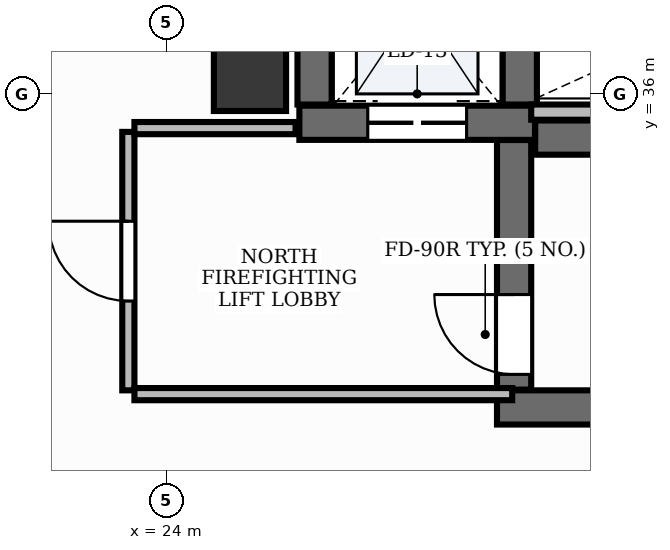
"""IFC4 building model, lengths in metres.
Left out: names, types, materials, properties, quantities, classifications, styles, units other than length and angle.
Written with IfcOpenShell. Run it as: python <this file> out.ifc"""

import sys

from ifc_helpers import new_model, si_unit, direction, frame, frame_2d, origin, origin_2d, place, context, subcontext, project, spatial, rectangle, extrude, element, fill, save


model = new_model("IFC4")
c1 = context("Model", 3, precision=1e-05, world=origin(), true_north=direction((0.0, 1.0)))
c2 = subcontext(c1, "Body", "Model", "MODEL_VIEW")
j1 = project(units=[si_unit("LENGTHUNIT", "METRE"), si_unit("PLANEANGLEUNIT", "RADIAN")], contexts=[c1])
p1 = place(None, origin())
s1 = spatial("IfcSite", under=j1, at=p1, CompositionType="ELEMENT")
p2 = place(p1, origin())
s2 = spatial("IfcBuilding", under=s1, at=p2, CompositionType="ELEMENT")
p3 = place(p2, frame((0.0, 0.0, 127.8)))
s3 = spatial("IfcBuildingStorey", under=s2, at=p3, CompositionType="ELEMENT", Elevation=127.8)
p4 = place(p3, frame((28.852, 35.425, 0.0), z_axis=(0.0, 0.0, 1.0), x_axis=(1.0, 0.0, 0.0)))
e1 = element("IfcWall", 1, at=p4, inside=s3, PredefinedType="SHEAR", context=c2, shape_type="SweptSolid", body=[
    extrude(rectangle(XDim=8.248, YDim=0.45, at=frame_2d((4.124, 0.0))), origin(), (0.0, 0.0, 1.0), 3.9),
])
p5 = place(p3, frame((28.35, 31.875, 0.0), z_axis=(0.0, 0.0, 1.0), x_axis=(1.0, 0.0, 0.0)))
e2 = element("IfcWall", 2, at=p5, inside=s3, PredefinedType="SHEAR", context=c2, shape_type="SweptSolid", body=[
    extrude(rectangle(XDim=8.75, YDim=0.45, at=frame_2d((4.375, 0.0))), origin(), (0.0, 0.0, 1.0), 3.9),
])
p6 = place(p3, frame((28.575, 32.11, 0.0), z_axis=(0.0, 0.0, 1.0), x_axis=(0.0, 1.0, 0.0)))
e3 = element("IfcWall", 3, at=p6, inside=s3, PredefinedType="SHEAR", context=c2, shape_type="SweptSolid", body=[
    extrude(rectangle(XDim=3.283, YDim=0.45, at=frame_2d((1.642, 0.0))), origin(), (0.0, 0.0, 1.0), 3.9),
])
p7 = place(p6, frame((0.2, 0.0, 0.0)))
e4 = element("IfcOpeningElement", 4, at=p7, cuts=e3, PredefinedType="OPENING", context=c2, shape_type="SweptSolid", body=[
    extrude(rectangle(XDim=1.05, YDim=2.15, at=frame_2d((0.525, 1.075))), frame((0.0, 0.24, 0.0), z_axis=(0.0, -1.0, 0.0), x_axis=(1.0, 0.0, 0.0)), (0.0, 0.0, 1.0), 0.48),
])
p8 = place(p3, frame((25.75, 35.62, 0.0), z_axis=(0.0, 0.0, 1.0), x_axis=(1.0, 0.0, 0.0)))
e5 = element("IfcWall", 5, at=p8, inside=s3, PredefinedType="SHEAR", context=c2, shape_type="SweptSolid", body=[
    extrude(rectangle(XDim=3.1, YDim=0.45, at=frame_2d((1.55, 0.0))), origin(), (0.0, 0.0, 1.0), 3.9),
])
p9 = place(p8, frame((0.9, 0.0, 0.0)))
e6 = element("IfcOpeningElement", 6, at=p9, cuts=e5, PredefinedType="OPENING", context=c2, shape_type="SweptSolid", body=[
    extrude(rectangle(XDim=1.3, YDim=2.2, at=frame_2d((0.65, 1.1))), frame((0.0, 0.24, 0.0), z_axis=(0.0, -1.0, 0.0), x_axis=(1.0, 0.0, 0.0)), (0.0, 0.0, 1.0), 0.48),
])
for number, where, z_axis, x_axis in (
    (7, (25.95, 35.86, 0.0), (0.0, 0.0, 1.0), (0.0, 1.0, 0.0)),
    (8, (28.65, 35.86, 0.0), (0.0, 0.0, 1.0), (0.0, 1.0, 0.0)),
):
    element("IfcWall", number, at=place(p3, frame(where, z_axis=z_axis, x_axis=x_axis)), inside=s3, PredefinedType="SHEAR", context=c2, shape_type="SweptSolid", body=[
        extrude(rectangle(XDim=2.7, YDim=0.45, at=frame_2d((1.35, 0.0))), origin(), (0.0, 0.0, 1.0), 3.9),
    ])
p10 = place(p3, frame((25.1, 36.25, -0.0), z_axis=(0.0, 0.0, 1.0), x_axis=(1.0, 0.0, 0.0)))
e9 = element("IfcColumn", 9, at=p10, inside=s3, PredefinedType="PILASTER", context=c2, shape_type="SweptSolid", body=[
    extrude(rectangle(XDim=0.95, YDim=0.95, at=origin_2d()), origin(), (0.0, 0.0, 1.0), 3.901),
])
p11 = place(p3, frame((28.8, 35.76, 0.0), z_axis=(0.0, 0.0, 1.0), x_axis=(1.0, 0.0, 0.0)))
e10 = element("IfcWall", 10, at=p11, inside=s3, PredefinedType="PARTITIONING", context=c2, shape_type="SweptSolid", body=[
    extrude(rectangle(XDim=4.57, YDim=0.2, at=frame_2d((2.285, 0.0))), origin(), (0.0, 0.0, 1.0), 2.91),
])
p12 = place(p3, frame((23.5, 32.1, 0.0), z_axis=(0.0, 0.0, 1.0), x_axis=(0.0, 1.0, 0.0)))
e11 = element("IfcWall", 11, at=p12, inside=s3, PredefinedType="PARTITIONING", context=c2, shape_type="SweptSolid", body=[
    extrude(rectangle(XDim=3.4, YDim=0.16, at=frame_2d((1.7, 0.0))), origin(), (0.0, 0.0, 1.0), 2.91),
])
p13 = place(p12, frame((1.175, 0.0, 0.0)))
e12 = element("IfcOpeningElement", 12, at=p13, cuts=e11, PredefinedType="OPENING", context=c2, shape_type="SweptSolid", body=[
    extrude(rectangle(XDim=1.05, YDim=2.15, at=frame_2d((0.525, 1.075))), frame((0.0, 0.095, 0.0), z_axis=(0.0, -1.0, 0.0), x_axis=(1.0, 0.0, 0.0)), (0.0, 0.0, 1.0), 0.19),
])
p14 = place(p3, frame((23.58, 32.05, 0.0), z_axis=(0.0, 0.0, 1.0), x_axis=(1.0, 0.0, 0.0)))
e13 = element("IfcWall", 13, at=p14, inside=s3, PredefinedType="PARTITIONING", context=c2, shape_type="SweptSolid", body=[
    extrude(rectangle(XDim=4.97, YDim=0.16, at=frame_2d((2.485, 0.0))), origin(), (0.0, 0.0, 1.0), 2.91),
])
p15 = place(p3, frame((23.58, 35.55, 0.0), z_axis=(0.0, 0.0, 1.0), x_axis=(1.0, 0.0, 0.0)))
e14 = element("IfcWall", 14, at=p15, inside=s3, PredefinedType="PARTITIONING", context=c2, shape_type="SweptSolid", body=[
    extrude(rectangle(XDim=2.12, YDim=0.16, at=frame_2d((1.06, 0.0))), origin(), (0.0, 0.0, 1.0), 2.91),
])
p16 = place(p7, origin())
e15 = element("IfcDoor", 15, at=p16, inside=s3, OperationType="SINGLE_SWING_RIGHT", PredefinedType="DOOR", context=c2, shape_type="SweptSolid", body=[
    extrude(rectangle(XDim=1.05, YDim=2.15, at=frame_2d((0.525, 1.075))), frame((0.0, 0.025, 0.0), z_axis=(0.0, -1.0, 0.0), x_axis=(1.0, 0.0, 0.0)), (0.0, 0.0, 1.0), 0.05),
])
fill(e4, e15)
p17 = place(p9, origin())
e16 = element("IfcDoor", 16, at=p17, inside=s3, OperationType="DOUBLE_DOOR_SLIDING", PredefinedType="DOOR", context=c2, shape_type="SweptSolid", body=[
    extrude(rectangle(XDim=1.3, YDim=2.2, at=frame_2d((0.65, 1.1))), frame((0.0, 0.025, 0.0), z_axis=(0.0, -1.0, 0.0), x_axis=(1.0, 0.0, 0.0)), (0.0, 0.0, 1.0), 0.05),
])
fill(e6, e16)
p18 = place(p13, origin())
e17 = element("IfcDoor", 17, at=p18, inside=s3, OperationType="SINGLE_SWING_RIGHT", PredefinedType="DOOR", context=c2, shape_type="SweptSolid", body=[
    extrude(rectangle(XDim=1.05, YDim=2.15, at=frame_2d((0.525, 1.075))), frame((0.0, 0.025, 0.0), z_axis=(0.0, -1.0, 0.0), x_axis=(1.0, 0.0, 0.0)), (0.0, 0.0, 1.0), 0.05),
])
fill(e12, e17)
save(model, sys.argv[1])
